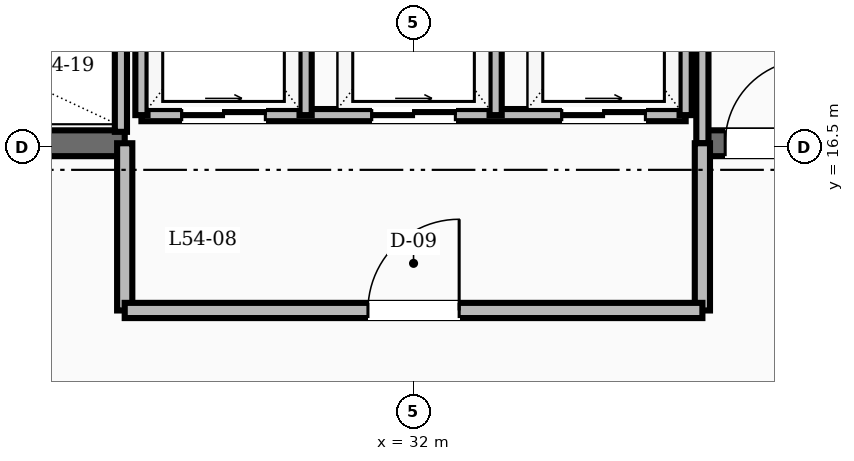
"""IFC4 building model, lengths in metres.
Left out: names, types, materials, properties, quantities, classifications, styles, units other than length and angle.
Written with IfcOpenShell. Run it as: python <this file> out.ifc"""

import sys

from ifc_helpers import new_model, si_unit, direction, frame, frame_2d, origin, place, context, subcontext, project, spatial, rectangle, extrude, element, fill, save


model = new_model("IFC4")
c1 = context("Model", 3, precision=1e-05, world=origin(), true_north=direction((0.0, 1.0)))
c2 = subcontext(c1, "Body", "Model", "MODEL_VIEW")
j1 = project(units=[si_unit("LENGTHUNIT", "METRE"), si_unit("PLANEANGLEUNIT", "RADIAN")], contexts=[c1])
p1 = place(None, origin())
s1 = spatial("IfcSite", under=j1, at=p1, CompositionType="ELEMENT")
p2 = place(p1, origin())
s2 = spatial("IfcBuilding", under=s1, at=p2, CompositionType="ELEMENT")
p3 = place(p2, frame((0.0, 0.0, 208.4)))
s3 = spatial("IfcBuildingStorey", under=s2, at=p3, CompositionType="ELEMENT", Elevation=208.4)
p4 = place(p3, frame((24.97, 16.55, 0.0), z_axis=(0.0, 0.0, 1.0), x_axis=(1.0, 0.0, 0.0)))
e1 = element("IfcWall", 1, at=p4, inside=s3, PredefinedType="SHEAR", context=c2, shape_type="SweptSolid", body=[
    extrude(rectangle(XDim=3.23, YDim=0.34, at=frame_2d((1.615, 0.0))), origin(), (0.0, 0.0, 1.0), 6.4),
])
p5 = place(p3, frame((35.8, 16.55, 0.0), z_axis=(0.0, 0.0, 1.0), x_axis=(1.0, 0.0, 0.0)))
e2 = element("IfcWall", 2, at=p5, inside=s3, PredefinedType="SHEAR", context=c2, shape_type="SweptSolid", body=[
    extrude(rectangle(XDim=3.23, YDim=0.34, at=frame_2d((1.615, 0.0))), origin(), (0.0, 0.0, 1.0), 6.4),
])
p6 = place(p5, frame((0.3, 0.0, 0.0)))
e3 = element("IfcOpeningElement", 3, at=p6, cuts=e2, PredefinedType="OPENING", context=c2, shape_type="SweptSolid", body=[
    extrude(rectangle(XDim=1.1, YDim=2.1, at=frame_2d((0.55, 1.05))), frame((0.0, 0.18, 0.0), z_axis=(0.0, -1.0, 0.0), x_axis=(1.0, 0.0, 0.0)), (0.0, 0.0, 1.0), 0.36),
])
p7 = place(p3, frame((35.8, 16.55, 0.0), z_axis=(0.0, 0.0, 1.0), x_axis=(0.0, 1.0, 0.0)))
e4 = element("IfcWall", 4, at=p7, inside=s3, PredefinedType="SOLIDWALL", context=c2, shape_type="SweptSolid", body=[
    extrude(rectangle(XDim=3.3, YDim=0.16, at=frame_2d((1.65, 0.0))), origin(), (0.0, 0.0, 1.0), 5.13),
])
for number, where, z_axis, x_axis in (
    (5, (28.2, 14.35, 0.0), (0.0, 0.0, 1.0), (0.0, 1.0, 0.0)),
    (6, (35.8, 14.35, 0.0), (0.0, 0.0, 1.0), (0.0, 1.0, 0.0)),
):
    element("IfcWall", number, at=place(p3, frame(where, z_axis=z_axis, x_axis=x_axis)), inside=s3, PredefinedType="SOLIDWALL", context=c2, shape_type="SweptSolid", body=[
        extrude(rectangle(XDim=2.2, YDim=0.2, at=frame_2d((1.1, 0.0))), origin(), (0.0, 0.0, 1.0), 5.13),
    ])
p8 = place(p3, frame((28.2, 14.35, 0.0), z_axis=(0.0, 0.0, 1.0), x_axis=(1.0, 0.0, 0.0)))
e7 = element("IfcWall", 7, at=p8, inside=s3, PredefinedType="SOLIDWALL", context=c2, shape_type="SweptSolid", body=[
    extrude(rectangle(XDim=7.6, YDim=0.2, at=frame_2d((3.8, 0.0))), origin(), (0.0, 0.0, 1.0), 5.13),
])
p9 = place(p8, frame((3.2, 0.0, 0.0)))
e8 = element("IfcOpeningElement", 8, at=p9, cuts=e7, PredefinedType="OPENING", context=c2, shape_type="SweptSolid", body=[
    extrude(rectangle(XDim=1.2, YDim=2.1, at=frame_2d((0.6, 1.05))), frame((0.0, 0.11, 0.0), z_axis=(0.0, -1.0, 0.0), x_axis=(1.0, 0.0, 0.0)), (0.0, 0.0, 1.0), 0.22),
])
p10 = place(p3, frame((28.42, 16.92, 0.0), z_axis=(0.0, 0.0, 1.0), x_axis=(1.0, 0.0, 0.0)))
e9 = element("IfcWall", 9, at=p10, inside=s3, PredefinedType="SOLIDWALL", context=c2, shape_type="SweptSolid", body=[
    extrude(rectangle(XDim=7.16, YDim=0.16, at=frame_2d((3.58, 0.0))), origin(), (0.0, 0.0, 1.0), 5.13),
])
p11 = place(p10, frame((0.53, 0.0, 0.0)))
e10 = element("IfcOpeningElement", 10, at=p11, cuts=e9, PredefinedType="OPENING", context=c2, shape_type="SweptSolid", body=[
    extrude(rectangle(XDim=1.1, YDim=2.15, at=frame_2d((0.55, 1.075))), frame((0.0, 0.09, 0.0), z_axis=(0.0, -1.0, 0.0), x_axis=(1.0, 0.0, 0.0)), (0.0, 0.0, 1.0), 0.18),
])
p12 = place(p10, frame((3.03, 0.0, 0.0)))
e11 = element("IfcOpeningElement", 11, at=p12, cuts=e9, PredefinedType="OPENING", context=c2, shape_type="SweptSolid", body=[
    extrude(rectangle(XDim=1.1, YDim=2.15, at=frame_2d((0.55, 1.075))), frame((0.0, 0.09, 0.0), z_axis=(0.0, -1.0, 0.0), x_axis=(1.0, 0.0, 0.0)), (0.0, 0.0, 1.0), 0.18),
])
p13 = place(p10, frame((5.53, 0.0, 0.0)))
e12 = element("IfcOpeningElement", 12, at=p13, cuts=e9, PredefinedType="OPENING", context=c2, shape_type="SweptSolid", body=[
    extrude(rectangle(XDim=1.1, YDim=2.15, at=frame_2d((0.55, 1.075))), frame((0.0, 0.09, 0.0), z_axis=(0.0, -1.0, 0.0), x_axis=(1.0, 0.0, 0.0)), (0.0, 0.0, 1.0), 0.18),
])
for number, where, z_axis, x_axis in (
    (13, (28.42, 16.92, 0.0), (0.0, 0.0, 1.0), (0.0, 1.0, 0.0)),
    (14, (30.58, 16.92, 0.0), (0.0, 0.0, 1.0), (0.0, 1.0, 0.0)),
    (15, (33.08, 16.92, 0.0), (0.0, 0.0, 1.0), (0.0, 1.0, 0.0)),
    (16, (35.58, 16.92, 0.0), (0.0, 0.0, 1.0), (0.0, 1.0, 0.0)),
):
    element("IfcWall", number, at=place(p3, frame(where, z_axis=z_axis, x_axis=x_axis)), inside=s3, PredefinedType="SOLIDWALL", context=c2, shape_type="SweptSolid", body=[
        extrude(rectangle(XDim=2.76, YDim=0.16, at=frame_2d((1.38, 0.0))), origin(), (0.0, 0.0, 1.0), 5.13),
    ])
p14 = place(p3, frame((28.15, 16.7, 0.0), z_axis=(0.0, 0.0, 1.0), x_axis=(0.0, 1.0, 0.0)))
e17 = element("IfcWall", 17, at=p14, inside=s3, PredefinedType="SOLIDWALL", context=c2, shape_type="SweptSolid", body=[
    extrude(rectangle(XDim=6.05, YDim=0.16, at=frame_2d((3.025, 0.0))), origin(), (0.0, 0.0, 1.0), 5.13),
])
p15 = place(p6, origin())
e18 = element("IfcDoor", 18, at=p15, inside=s3, OperationType="SINGLE_SWING_RIGHT", PredefinedType="DOOR", context=c2, shape_type="SweptSolid", body=[
    extrude(rectangle(XDim=1.1, YDim=2.1, at=frame_2d((0.55, 1.05))), frame((0.0, 0.025, 0.0), z_axis=(0.0, -1.0, 0.0), x_axis=(1.0, 0.0, 0.0)), (0.0, 0.0, 1.0), 0.05),
])
fill(e3, e18)
p16 = place(p9, origin())
e19 = element("IfcDoor", 19, at=p16, inside=s3, OperationType="SINGLE_SWING_RIGHT", PredefinedType="DOOR", context=c2, shape_type="SweptSolid", body=[
    extrude(rectangle(XDim=1.2, YDim=2.1, at=frame_2d((0.6, 1.05))), frame((0.0, 0.025, 0.0), z_axis=(0.0, -1.0, 0.0), x_axis=(1.0, 0.0, 0.0)), (0.0, 0.0, 1.0), 0.05),
])
fill(e8, e19)
p17 = place(p11, origin())
e20 = element("IfcDoor", 20, at=p17, inside=s3, OperationType="SLIDING_TO_RIGHT", PredefinedType="DOOR", context=c2, shape_type="SweptSolid", body=[
    extrude(rectangle(XDim=1.1, YDim=2.15, at=frame_2d((0.55, 1.075))), frame((0.0, 0.025, 0.0), z_axis=(0.0, -1.0, 0.0), x_axis=(1.0, 0.0, 0.0)), (0.0, 0.0, 1.0), 0.05),
])
fill(e10, e20)
p18 = place(p12, origin())
e21 = element("IfcDoor", 21, at=p18, inside=s3, OperationType="SLIDING_TO_RIGHT", PredefinedType="DOOR", context=c2, shape_type="SweptSolid", body=[
    extrude(rectangle(XDim=1.1, YDim=2.15, at=frame_2d((0.55, 1.075))), frame((0.0, 0.025, 0.0), z_axis=(0.0, -1.0, 0.0), x_axis=(1.0, 0.0, 0.0)), (0.0, 0.0, 1.0), 0.05),
])
fill(e11, e21)
p19 = place(p13, origin())
e22 = element("IfcDoor", 22, at=p19, inside=s3, OperationType="SLIDING_TO_RIGHT", PredefinedType="DOOR", context=c2, shape_type="SweptSolid", body=[
    extrude(rectangle(XDim=1.1, YDim=2.15, at=frame_2d((0.55, 1.075))), frame((0.0, 0.025, 0.0), z_axis=(0.0, -1.0, 0.0), x_axis=(1.0, 0.0, 0.0)), (0.0, 0.0, 1.0), 0.05),
])
fill(e12, e22)
save(model, sys.argv[1])
